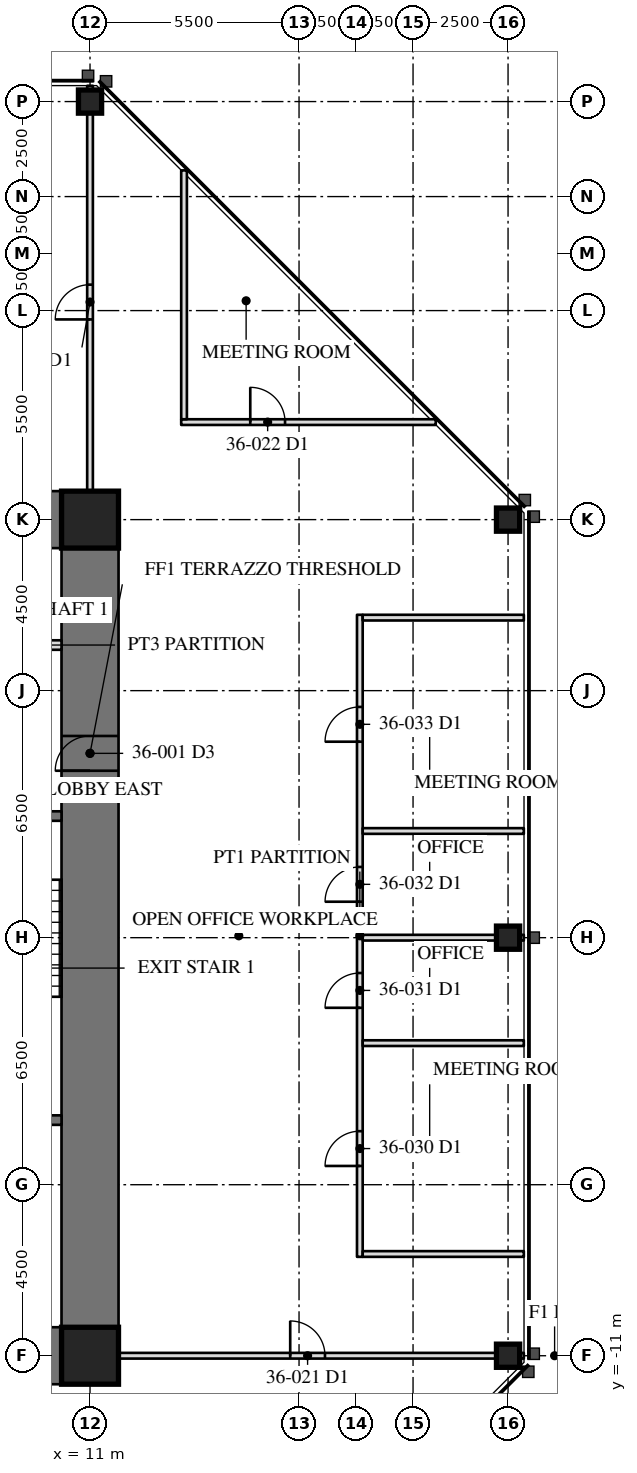
"""IFC4 building model, lengths in metres.
Left out: names, types, materials, properties, quantities, classifications, styles, units other than length and angle.
Written with IfcOpenShell. Run it as: python <this file> out.ifc"""

import sys

from ifc_helpers import new_model, si_unit, direction, frame, frame_2d, origin, origin_2d, place, context, subcontext, project, spatial, rectangle, hollow_rectangle, extrude, element, fill, save


model = new_model("IFC4")
c1 = context("Model", 3, precision=1e-05, world=origin(), true_north=direction((0.0, 1.0)))
c2 = subcontext(c1, "Body", "Model", "MODEL_VIEW")
j1 = project(units=[si_unit("LENGTHUNIT", "METRE"), si_unit("PLANEANGLEUNIT", "RADIAN")], contexts=[c1])
p1 = place(None, origin())
s1 = spatial("IfcSite", under=j1, at=p1, CompositionType="ELEMENT")
p2 = place(p1, origin())
s2 = spatial("IfcBuilding", under=s1, at=p2, CompositionType="ELEMENT")
p3 = place(p2, frame((0.0, 0.0, 154.1)))
s3 = spatial("IfcBuildingStorey", under=s2, at=p3, CompositionType="ELEMENT", Elevation=154.1)
for number, where, z_axis, x_axis in (
    (1, (22.0, -11.0, 0.0), (0.0, 0.0, 1.0), (0.0, 1.0, 0.0)),
    (2, (22.0, 0.0, 0.0), (0.0, 0.0, 1.0), (0.0, 1.0, 0.0)),
    (3, (22.0, 11.0, 0.0), (0.0, 0.0, 1.0), (0.0, 1.0, 0.0)),
    (4, (11.0, 22.0, 0.0), (0.0, 0.0, 1.0), (1.0, 0.0, 0.0)),
):
    element("IfcColumn", number, at=place(p3, frame(where, z_axis=z_axis, x_axis=x_axis)), inside=s3, PredefinedType="COLUMN", context=c2, shape_type="SweptSolid", body=[
        extrude(hollow_rectangle(XDim=0.61, YDim=0.61, WallThickness=0.076, at=origin_2d()), origin(), (0.0, 0.0, 1.0), 4.1),
    ])
p4 = place(p3, frame((11.0, -11.0, 0.0), z_axis=(0.0, 0.0, 1.0), x_axis=(0.0, 1.0, 0.0)))
e5 = element("IfcWall", 5, at=p4, inside=s3, PredefinedType="SHEAR", context=c2, shape_type="SweptSolid", body=[
    extrude(rectangle(XDim=22.0, YDim=1.5, at=frame_2d((11.0, 0.0))), origin(), (0.0, 0.0, 1.0), 4.1),
])
p5 = place(p4, frame((15.393, 0.0, 0.0)))
e6 = element("IfcOpeningElement", 6, at=p5, cuts=e5, PredefinedType="OPENING", context=c2, shape_type="SweptSolid", body=[
    extrude(rectangle(XDim=0.915, YDim=2.134, at=frame_2d((0.458, 1.067))), frame((0.0, 0.76, 0.0), z_axis=(0.0, -1.0, 0.0), x_axis=(1.0, 0.0, 0.0)), (0.0, 0.0, 1.0), 1.52),
])
for number, where, z_axis, x_axis in (
    (7, (11.0, 11.0, 0.0), (0.0, 0.0, 1.0), (-1.0, 0.0, 0.0)),
    (8, (6.5, -11.0, 0.0), (0.0, 0.0, 1.0), (1.0, 0.0, 0.0)),
):
    element("IfcWall", number, at=place(p3, frame(where, z_axis=z_axis, x_axis=x_axis)), inside=s3, PredefinedType="SHEAR", context=c2, shape_type="SweptSolid", body=[
        extrude(rectangle(XDim=4.5, YDim=1.5, at=frame_2d((2.25, 0.0))), origin(), (0.0, 0.0, 1.0), 4.1),
    ])
for number, where, z_axis, x_axis in (
    (9, (11.0, 11.0, 0.0), (0.0, 0.0, 1.0), (1.0, 0.0, 0.0)),
    (10, (11.0, -11.0, 0.0), (0.0, 0.0, 1.0), (1.0, 0.0, 0.0)),
):
    element("IfcColumn", number, at=place(p3, frame(where, z_axis=z_axis, x_axis=x_axis)), inside=s3, PredefinedType="COLUMN", context=c2, shape_type="SweptSolid", body=[
        extrude(hollow_rectangle(XDim=1.499, YDim=1.499, WallThickness=0.102, at=origin_2d()), origin(), (0.0, 0.0, 1.0), 4.1),
    ])
p6 = place(p3, frame((6.95, -4.8, 0.0), z_axis=(0.0, 0.0, 1.0), x_axis=(1.0, 0.0, 0.0)))
e11 = element("IfcWall", 11, at=p6, inside=s3, PredefinedType="SOLIDWALL", context=c2, shape_type="SweptSolid", body=[
    extrude(rectangle(XDim=3.3, YDim=0.25, at=frame_2d((1.65, 0.0))), origin(), (0.0, 0.0, 1.0), 3.91),
])
p7 = place(p3, frame((6.95, 3.2, 0.0), z_axis=(0.0, 0.0, 1.0), x_axis=(1.0, 0.0, 0.0)))
e12 = element("IfcWall", 12, at=p7, inside=s3, PredefinedType="SOLIDWALL", context=c2, shape_type="SweptSolid", body=[
    extrude(rectangle(XDim=3.3, YDim=0.25, at=frame_2d((1.65, 0.0))), origin(), (0.0, 0.0, 1.0), 3.91),
])
p8 = place(p7, frame((1.116, 0.0, 0.0)))
e13 = element("IfcOpeningElement", 13, at=p8, cuts=e12, PredefinedType="OPENING", context=c2, shape_type="SweptSolid", body=[
    extrude(rectangle(XDim=1.067, YDim=2.134, at=frame_2d((0.533, 1.067))), frame((0.0, 0.135, 0.0), z_axis=(0.0, -1.0, 0.0), x_axis=(1.0, 0.0, 0.0)), (0.0, 0.0, 1.0), 0.27),
])
p9 = place(p3, frame((6.95, 7.7, 0.0), z_axis=(0.0, 0.0, 1.0), x_axis=(1.0, 0.0, 0.0)))
e14 = element("IfcWall", 14, at=p9, inside=s3, PredefinedType="PARTITIONING", context=c2, shape_type="SweptSolid", body=[
    extrude(rectangle(XDim=3.3, YDim=0.25, at=frame_2d((1.65, 0.0))), origin(), (0.0, 0.0, 1.0), 3.91),
])
p10 = place(p9, frame((0.45, 0.0, 0.0)))
e15 = element("IfcOpeningElement", 15, at=p10, cuts=e14, PredefinedType="OPENING", context=c2, shape_type="SweptSolid", body=[
    extrude(rectangle(XDim=1.219, YDim=2.134, at=frame_2d((0.609, 1.067))), frame((0.0, 0.135, 0.0), z_axis=(0.0, -1.0, 0.0), x_axis=(1.0, 0.0, 0.0)), (0.0, 0.0, 1.0), 0.27),
])
p11 = place(p3, frame((11.0, 11.75, 0.0), z_axis=(0.0, 0.0, 1.0), x_axis=(0.0, 1.0, 0.0)))
e16 = element("IfcWall", 16, at=p11, inside=s3, PredefinedType="PARTITIONING", context=c2, shape_type="SweptSolid", body=[
    extrude(rectangle(XDim=10.665, YDim=0.15, at=frame_2d((5.333, 0.0))), origin(), (0.0, 0.0, 1.0), 3.326),
])
p12 = place(p11, frame((4.518, 0.0, 0.0)))
e17 = element("IfcOpeningElement", 17, at=p12, cuts=e16, PredefinedType="OPENING", context=c2, shape_type="SweptSolid", body=[
    extrude(rectangle(XDim=0.915, YDim=2.134, at=frame_2d((0.458, 1.067))), frame((0.0, 0.085, 0.0), z_axis=(0.0, -1.0, 0.0), x_axis=(1.0, 0.0, 0.0)), (0.0, 0.0, 1.0), 0.17),
])
p13 = place(p3, frame((11.75, -11.0, 0.0), z_axis=(0.0, 0.0, 1.0), x_axis=(1.0, 0.0, 0.0)))
e18 = element("IfcWall", 18, at=p13, inside=s3, PredefinedType="PARTITIONING", context=c2, shape_type="SweptSolid", body=[
    extrude(rectangle(XDim=10.665, YDim=0.15, at=frame_2d((5.333, 0.0))), origin(), (0.0, 0.0, 1.0), 3.326),
])
p14 = place(p13, frame((4.518, 0.0, 0.0)))
e19 = element("IfcOpeningElement", 19, at=p14, cuts=e18, PredefinedType="OPENING", context=c2, shape_type="SweptSolid", body=[
    extrude(rectangle(XDim=0.915, YDim=2.134, at=frame_2d((0.458, 1.067))), frame((0.0, 0.085, 0.0), z_axis=(0.0, -1.0, 0.0), x_axis=(1.0, 0.0, 0.0)), (0.0, 0.0, 1.0), 0.17),
])
p15 = place(p3, frame((13.399, 13.566, 0.0), z_axis=(0.0, 0.0, 1.0), x_axis=(1.0, 0.0, 0.0)))
e20 = element("IfcWall", 20, at=p15, inside=s3, PredefinedType="PARTITIONING", context=c2, shape_type="SweptSolid", body=[
    extrude(rectangle(XDim=6.698, YDim=0.15, at=frame_2d((3.349, 0.0))), origin(), (0.0, 0.0, 1.0), 3.91),
])
p16 = place(p15, frame((1.817, 0.0, 0.0)))
e21 = element("IfcOpeningElement", 21, at=p16, cuts=e20, PredefinedType="OPENING", context=c2, shape_type="SweptSolid", body=[
    extrude(rectangle(XDim=0.915, YDim=2.134, at=frame_2d((0.458, 1.067))), frame((0.0, 0.085, 0.0), z_axis=(0.0, -1.0, 0.0), x_axis=(1.0, 0.0, 0.0)), (0.0, 0.0, 1.0), 0.17),
])
p17 = place(p3, frame((13.474, 13.641, 0.0), z_axis=(0.0, 0.0, 1.0), x_axis=(0.0, 1.0, 0.0)))
e22 = element("IfcWall", 22, at=p17, inside=s3, PredefinedType="PARTITIONING", context=c2, shape_type="SweptSolid", body=[
    extrude(rectangle(XDim=6.548, YDim=0.15, at=frame_2d((3.274, 0.0))), origin(), (0.0, 0.0, 1.0), 3.91),
])
p18 = place(p3, frame((18.1, -8.398, 0.0), z_axis=(0.0, 0.0, 1.0), x_axis=(0.0, 1.0, 0.0)))
e23 = element("IfcWall", 23, at=p18, inside=s3, PredefinedType="PARTITIONING", context=c2, shape_type="SweptSolid", body=[
    extrude(rectangle(XDim=16.894, YDim=0.15, at=frame_2d((8.447, 0.0))), origin(), (0.0, 0.0, 1.0), 3.91),
])
p19 = place(p18, frame((2.392, 0.0, 0.0)))
e24 = element("IfcOpeningElement", 24, at=p19, cuts=e23, PredefinedType="OPENING", context=c2, shape_type="SweptSolid", body=[
    extrude(rectangle(XDim=0.915, YDim=2.134, at=frame_2d((0.458, 1.067))), frame((0.0, 0.085, 0.0), z_axis=(0.0, -1.0, 0.0), x_axis=(1.0, 0.0, 0.0)), (0.0, 0.0, 1.0), 0.17),
])
p20 = place(p18, frame((6.553, 0.0, 0.0)))
e25 = element("IfcOpeningElement", 25, at=p20, cuts=e23, PredefinedType="OPENING", context=c2, shape_type="SweptSolid", body=[
    extrude(rectangle(XDim=0.915, YDim=2.134, at=frame_2d((0.458, 1.067))), frame((0.0, 0.085, 0.0), z_axis=(0.0, -1.0, 0.0), x_axis=(1.0, 0.0, 0.0)), (0.0, 0.0, 1.0), 0.17),
])
p21 = place(p18, frame((9.344, 0.0, 0.0)))
e26 = element("IfcOpeningElement", 26, at=p21, cuts=e23, PredefinedType="OPENING", context=c2, shape_type="SweptSolid", body=[
    extrude(rectangle(XDim=0.915, YDim=2.134, at=frame_2d((0.458, 1.067))), frame((0.0, 0.085, 0.0), z_axis=(0.0, -1.0, 0.0), x_axis=(1.0, 0.0, 0.0)), (0.0, 0.0, 1.0), 0.17),
])
p22 = place(p18, frame((13.554, 0.0, 0.0)))
e27 = element("IfcOpeningElement", 27, at=p22, cuts=e23, PredefinedType="OPENING", context=c2, shape_type="SweptSolid", body=[
    extrude(rectangle(XDim=0.915, YDim=2.134, at=frame_2d((0.458, 1.067))), frame((0.0, 0.085, 0.0), z_axis=(0.0, -1.0, 0.0), x_axis=(1.0, 0.0, 0.0)), (0.0, 0.0, 1.0), 0.17),
])
for number, where, z_axis, x_axis in (
    (28, (18.175, -8.323, 0.0), (0.0, 0.0, 1.0), (1.0, 0.0, 0.0)),
    (29, (18.175, -2.775, 0.0), (0.0, 0.0, 1.0), (1.0, 0.0, 0.0)),
):
    element("IfcWall", number, at=place(p3, frame(where, z_axis=z_axis, x_axis=x_axis)), inside=s3, PredefinedType="PARTITIONING", context=c2, shape_type="SweptSolid", body=[
        extrude(rectangle(XDim=4.24, YDim=0.15, at=frame_2d((2.12, 0.0))), origin(), (0.0, 0.0, 1.0), 3.91),
    ])
p23 = place(p3, frame((18.175, 0.0, 0.0), z_axis=(0.0, 0.0, 1.0), x_axis=(1.0, 0.0, 0.0)))
e30 = element("IfcWall", 30, at=p23, inside=s3, PredefinedType="PARTITIONING", context=c2, shape_type="SweptSolid", body=[
    extrude(rectangle(XDim=4.24, YDim=0.15, at=frame_2d((2.12, 0.0))), origin(), (0.0, 0.0, 1.0), 3.326),
])
for number, where, z_axis, x_axis in (
    (31, (18.175, 2.807, 0.0), (0.0, 0.0, 1.0), (1.0, 0.0, 0.0)),
    (32, (18.175, 8.421, 0.0), (0.0, 0.0, 1.0), (1.0, 0.0, 0.0)),
):
    element("IfcWall", number, at=place(p3, frame(where, z_axis=z_axis, x_axis=x_axis)), inside=s3, PredefinedType="PARTITIONING", context=c2, shape_type="SweptSolid", body=[
        extrude(rectangle(XDim=4.24, YDim=0.15, at=frame_2d((2.12, 0.0))), origin(), (0.0, 0.0, 1.0), 3.91),
    ])
p24 = place(p5, origin())
e33 = element("IfcDoor", 33, at=p24, inside=s3, OperationType="SINGLE_SWING_RIGHT", PredefinedType="DOOR", context=c2, shape_type="SweptSolid", body=[
    extrude(rectangle(XDim=0.915, YDim=2.134, at=frame_2d((0.458, 1.067))), frame((0.0, -0.675, 0.0), z_axis=(0.0, -1.0, 0.0), x_axis=(1.0, 0.0, 0.0)), (0.0, 0.0, 1.0), 0.05),
])
fill(e6, e33)
p25 = place(p12, origin())
e34 = element("IfcDoor", 34, at=p25, inside=s3, OperationType="SINGLE_SWING_LEFT", PredefinedType="DOOR", context=c2, shape_type="SweptSolid", body=[
    extrude(rectangle(XDim=0.915, YDim=2.134, at=frame_2d((0.458, 1.067))), frame((0.0, 0.025, 0.0), z_axis=(0.0, -1.0, 0.0), x_axis=(1.0, 0.0, 0.0)), (0.0, 0.0, 1.0), 0.05),
])
fill(e17, e34)
p26 = place(p14, origin())
e35 = element("IfcDoor", 35, at=p26, inside=s3, OperationType="SINGLE_SWING_LEFT", PredefinedType="DOOR", context=c2, shape_type="SweptSolid", body=[
    extrude(rectangle(XDim=0.915, YDim=2.134, at=frame_2d((0.458, 1.067))), frame((0.0, 0.025, 0.0), z_axis=(0.0, -1.0, 0.0), x_axis=(1.0, 0.0, 0.0)), (0.0, 0.0, 1.0), 0.05),
])
fill(e19, e35)
p27 = place(p16, origin())
e36 = element("IfcDoor", 36, at=p27, inside=s3, OperationType="SINGLE_SWING_LEFT", PredefinedType="DOOR", context=c2, shape_type="SweptSolid", body=[
    extrude(rectangle(XDim=0.915, YDim=2.134, at=frame_2d((0.458, 1.067))), frame((0.0, 0.025, 0.0), z_axis=(0.0, -1.0, 0.0), x_axis=(1.0, 0.0, 0.0)), (0.0, 0.0, 1.0), 0.05),
])
fill(e21, e36)
p28 = place(p19, origin())
e37 = element("IfcDoor", 37, at=p28, inside=s3, OperationType="SINGLE_SWING_LEFT", PredefinedType="DOOR", context=c2, shape_type="SweptSolid", body=[
    extrude(rectangle(XDim=0.915, YDim=2.134, at=frame_2d((0.458, 1.067))), frame((0.0, 0.025, 0.0), z_axis=(0.0, -1.0, 0.0), x_axis=(1.0, 0.0, 0.0)), (0.0, 0.0, 1.0), 0.05),
])
fill(e24, e37)
p29 = place(p20, origin())
e38 = element("IfcDoor", 38, at=p29, inside=s3, OperationType="SINGLE_SWING_LEFT", PredefinedType="DOOR", context=c2, shape_type="SweptSolid", body=[
    extrude(rectangle(XDim=0.915, YDim=2.134, at=frame_2d((0.458, 1.067))), frame((0.0, 0.025, 0.0), z_axis=(0.0, -1.0, 0.0), x_axis=(1.0, 0.0, 0.0)), (0.0, 0.0, 1.0), 0.05),
])
fill(e25, e38)
p30 = place(p21, origin())
e39 = element("IfcDoor", 39, at=p30, inside=s3, OperationType="SINGLE_SWING_LEFT", PredefinedType="DOOR", context=c2, shape_type="SweptSolid", body=[
    extrude(rectangle(XDim=0.915, YDim=2.134, at=frame_2d((0.458, 1.067))), frame((0.0, 0.025, 0.0), z_axis=(0.0, -1.0, 0.0), x_axis=(1.0, 0.0, 0.0)), (0.0, 0.0, 1.0), 0.05),
])
fill(e26, e39)
p31 = place(p22, origin())
e40 = element("IfcDoor", 40, at=p31, inside=s3, OperationType="SINGLE_SWING_LEFT", PredefinedType="DOOR", context=c2, shape_type="SweptSolid", body=[
    extrude(rectangle(XDim=0.915, YDim=2.134, at=frame_2d((0.458, 1.067))), frame((0.0, 0.025, 0.0), z_axis=(0.0, -1.0, 0.0), x_axis=(1.0, 0.0, 0.0)), (0.0, 0.0, 1.0), 0.05),
])
fill(e27, e40)
save(model, sys.argv[1])
